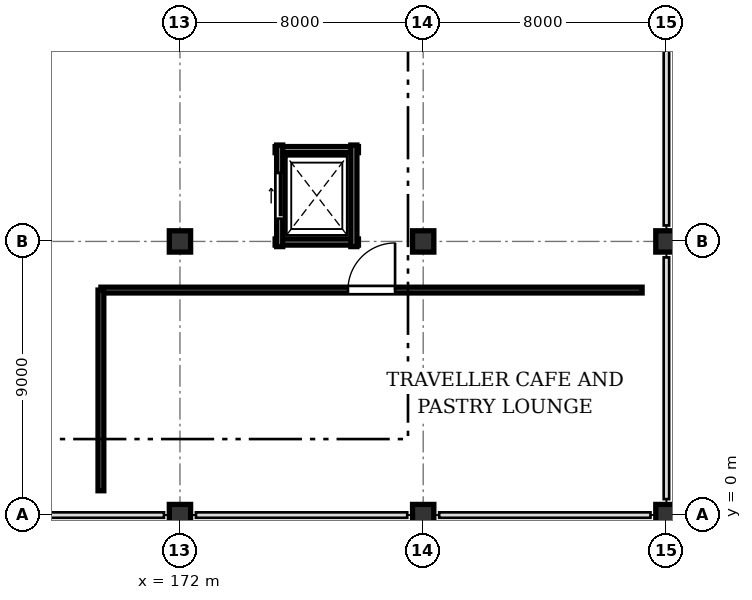
"""IFC4 building model, lengths in metres.
Left out: names, types, materials, properties, quantities, classifications, styles, units other than length and angle.
Written with IfcOpenShell. Run it as: python <this file> out.ifc"""

import sys

from ifc_helpers import new_model, si_unit, direction, frame, frame_2d, origin, origin_2d, place, context, subcontext, project, spatial, rectangle, extrude, element, fill, save


model = new_model("IFC4")
c1 = context("Model", 3, precision=1e-05, world=origin(), true_north=direction((0.0, 1.0)))
c2 = subcontext(c1, "Body", "Model", "MODEL_VIEW")
j1 = project(units=[si_unit("LENGTHUNIT", "METRE"), si_unit("PLANEANGLEUNIT", "RADIAN")], contexts=[c1])
p1 = place(None, origin())
s1 = spatial("IfcSite", under=j1, at=p1, CompositionType="ELEMENT")
p2 = place(p1, origin())
s2 = spatial("IfcBuilding", under=s1, at=p2, CompositionType="ELEMENT")
p3 = place(p2, frame((0.0, 0.0, 6.6)))
s3 = spatial("IfcBuildingStorey", under=s2, at=p3, CompositionType="ELEMENT", Elevation=6.6)
for number, where, z_axis, x_axis in (
    (1, (172.0, 0.0, 0.0), (0.0, 0.0, 1.0), (1.0, 0.0, 0.0)),
    (2, (172.0, 9.0, 0.0), (0.0, 0.0, 1.0), (1.0, 0.0, 0.0)),
    (3, (180.0, 0.0, 0.0), (0.0, 0.0, 1.0), (1.0, 0.0, 0.0)),
    (4, (180.0, 9.0, 0.0), (0.0, 0.0, 1.0), (1.0, 0.0, 0.0)),
    (5, (188.0, 0.0, 0.0), (0.0, 0.0, 1.0), (1.0, 0.0, 0.0)),
    (6, (188.0, 9.0, 0.0), (0.0, 0.0, 1.0), (1.0, 0.0, 0.0)),
):
    element("IfcColumn", number, at=place(p3, frame(where, z_axis=z_axis, x_axis=x_axis)), inside=s3, PredefinedType="COLUMN", context=c2, shape_type="SweptSolid", body=[
        extrude(rectangle(XDim=0.7, YDim=0.7, at=origin_2d()), origin(), (0.0, 0.0, 1.0), 4.2),
    ])
for number, where, z_axis, x_axis in (
    (7, (175.13, 8.98, 0.0), (0.0, 0.0, 1.0), (1.0, 0.0, 0.0)),
    (8, (177.87, 12.02, 0.0), (0.0, 0.0, 1.0), (-1.0, 0.0, 0.0)),
):
    element("IfcWall", number, at=place(p3, frame(where, z_axis=z_axis, x_axis=x_axis)), inside=s3, PredefinedType="SOLIDWALL", context=c2, shape_type="SweptSolid", body=[
        extrude(rectangle(XDim=2.74, YDim=0.2, at=frame_2d((1.37, 0.0))), origin(), (0.0, 0.0, 1.0), 3.935),
    ])
p4 = place(p3, frame((175.28, 12.17, 0.0), z_axis=(0.0, 0.0, 1.0), x_axis=(0.0, -1.0, 0.0)))
e9 = element("IfcWall", 9, at=p4, inside=s3, PredefinedType="SOLIDWALL", context=c2, shape_type="SweptSolid", body=[
    extrude(rectangle(XDim=3.34, YDim=0.2, at=frame_2d((1.67, 0.0))), origin(), (0.0, 0.0, 1.0), 3.935),
])
p5 = place(p4, frame((0.92, 0.0, 0.0)))
e10 = element("IfcOpeningElement", 10, at=p5, cuts=e9, PredefinedType="OPENING", context=c2, shape_type="SweptSolid", body=[
    extrude(rectangle(XDim=1.5, YDim=2.2, at=frame_2d((0.75, 1.1))), frame((0.0, 0.11, 0.0), z_axis=(0.0, -1.0, 0.0), x_axis=(1.0, 0.0, 0.0)), (0.0, 0.0, 1.0), 0.22),
])
p6 = place(p3, frame((177.72, 8.83, 0.0), z_axis=(0.0, 0.0, 1.0), x_axis=(0.0, 1.0, 0.0)))
e11 = element("IfcWall", 11, at=p6, inside=s3, PredefinedType="SOLIDWALL", context=c2, shape_type="SweptSolid", body=[
    extrude(rectangle(XDim=3.34, YDim=0.2, at=frame_2d((1.67, 0.0))), origin(), (0.0, 0.0, 1.0), 3.935),
])
p7 = place(p3, frame((169.4, 7.4, 0.0), z_axis=(0.0, 0.0, 1.0), x_axis=(1.0, 0.0, 0.0)))
e12 = element("IfcWall", 12, at=p7, inside=s3, PredefinedType="PARTITIONING", context=c2, shape_type="SweptSolid", body=[
    extrude(rectangle(XDim=17.8, YDim=0.19, at=frame_2d((8.9, 0.0))), origin(), (0.0, 0.0, 1.0), 3.465),
])
p8 = place(p7, frame((8.125, 0.0, 0.0)))
e13 = element("IfcOpeningElement", 13, at=p8, cuts=e12, PredefinedType="OPENING", context=c2, shape_type="SweptSolid", body=[
    extrude(rectangle(XDim=1.55, YDim=2.1, at=frame_2d((0.775, 1.05))), frame((0.0, 0.105, 0.0), z_axis=(0.0, -1.0, 0.0), x_axis=(1.0, 0.0, 0.0)), (0.0, 0.0, 1.0), 0.21),
])
p9 = place(p3, frame((169.4, 0.8, 0.0), z_axis=(0.0, 0.0, 1.0), x_axis=(0.0, 1.0, 0.0)))
e14 = element("IfcWall", 14, at=p9, inside=s3, PredefinedType="PARTITIONING", context=c2, shape_type="SweptSolid", body=[
    extrude(rectangle(XDim=6.6, YDim=0.19, at=frame_2d((3.3, 0.0))), origin(), (0.0, 0.0, 1.0), 3.475),
])
p10 = place(p5, origin())
e15 = element("IfcDoor", 15, at=p10, inside=s3, OperationType="SLIDING_TO_LEFT", PredefinedType="DOOR", context=c2, shape_type="SweptSolid", body=[
    extrude(rectangle(XDim=1.5, YDim=2.2, at=frame_2d((0.75, 1.1))), frame((0.0, 0.025, 0.0), z_axis=(0.0, -1.0, 0.0), x_axis=(1.0, 0.0, 0.0)), (0.0, 0.0, 1.0), 0.05),
])
fill(e10, e15)
p11 = place(p8, origin())
e16 = element("IfcDoor", 16, at=p11, inside=s3, OperationType="SINGLE_SWING_RIGHT", PredefinedType="DOOR", context=c2, shape_type="SweptSolid", body=[
    extrude(rectangle(XDim=1.55, YDim=2.1, at=frame_2d((0.775, 1.05))), frame((0.0, 0.025, 0.0), z_axis=(0.0, -1.0, 0.0), x_axis=(1.0, 0.0, 0.0)), (0.0, 0.0, 1.0), 0.05),
])
fill(e13, e16)
save(model, sys.argv[1])
